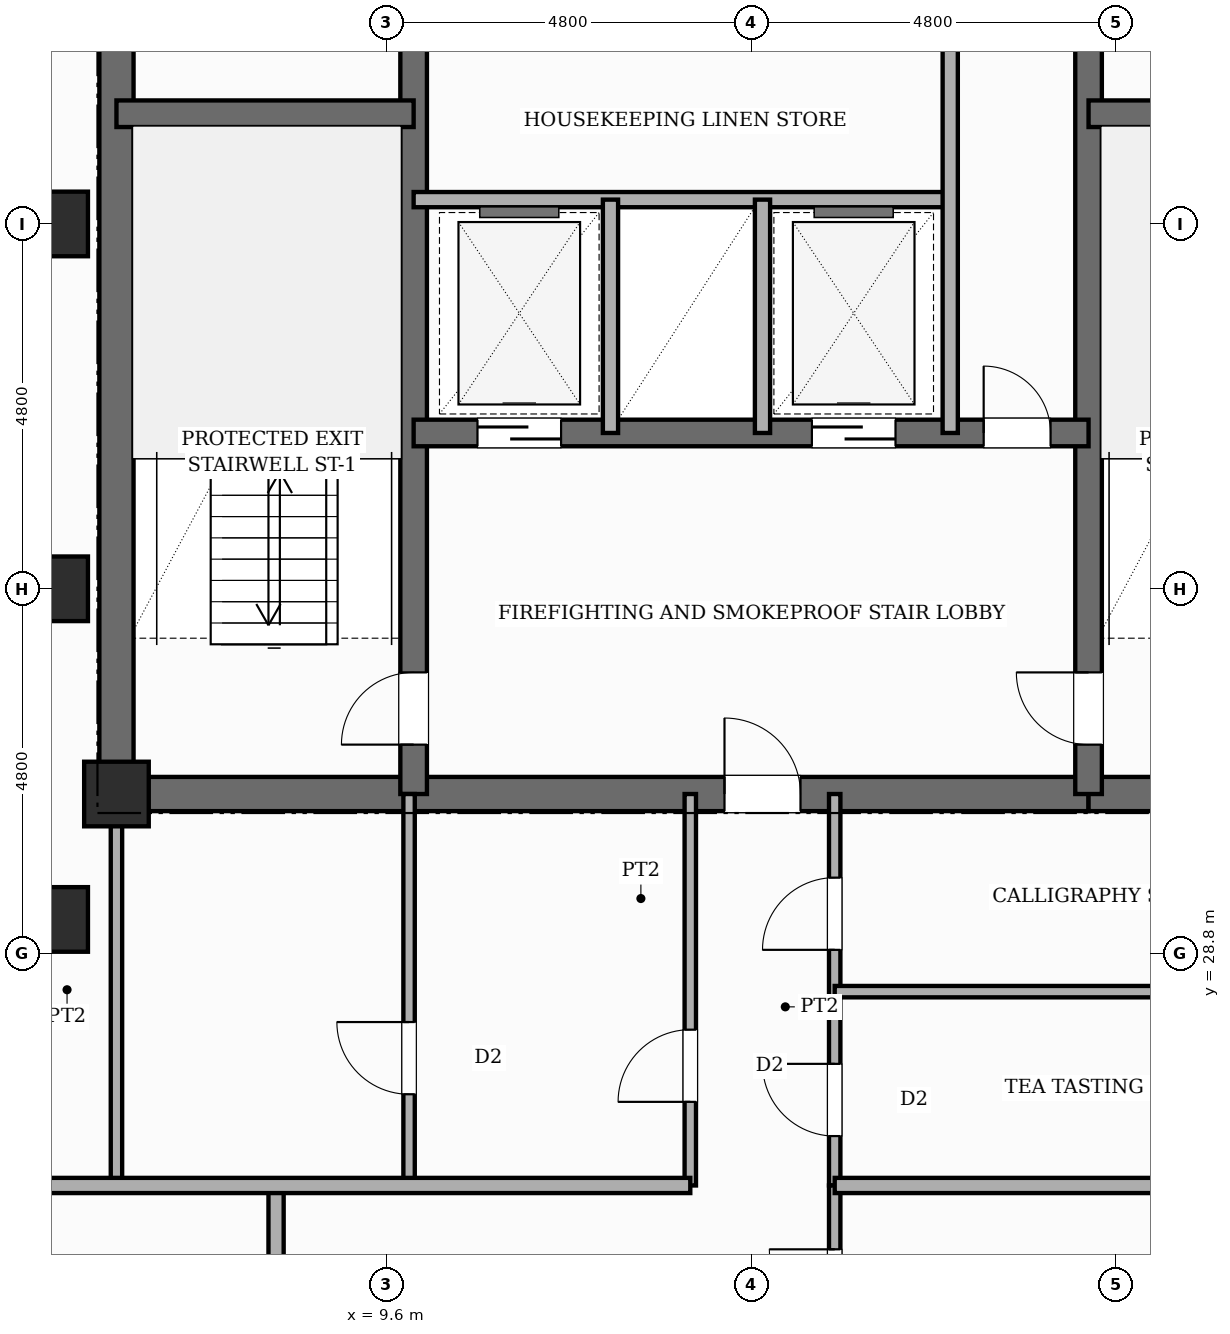
"""IFC4 building model, lengths in metres.
Left out: names, types, materials, properties, quantities, classifications, styles, units other than length and angle.
Written with IfcOpenShell. Run it as: python <this file> out.ifc"""

import sys

from ifc_helpers import new_model, si_unit, direction, frame, frame_2d, origin, origin_2d, place, context, subcontext, project, spatial, rectangle, extrude, element, fill, save


model = new_model("IFC4")
c1 = context("Model", 3, precision=1e-05, world=origin(), true_north=direction((0.0, 1.0)))
c2 = subcontext(c1, "Body", "Model", "MODEL_VIEW")
j1 = project(units=[si_unit("LENGTHUNIT", "METRE"), si_unit("PLANEANGLEUNIT", "RADIAN")], contexts=[c1])
p1 = place(None, origin())
s1 = spatial("IfcSite", under=j1, at=p1, CompositionType="ELEMENT")
p2 = place(p1, origin())
s2 = spatial("IfcBuilding", under=s1, at=p2, CompositionType="ELEMENT")
p3 = place(p2, frame((0.0, 0.0, 203.8)))
s3 = spatial("IfcBuildingStorey", under=s2, at=p3, CompositionType="ELEMENT", Elevation=203.8)
p4 = place(p3, frame((6.05, 30.675, 0.0), z_axis=(0.0, 0.0, 1.0), x_axis=(0.0, 1.0, 0.0)))
e1 = element("IfcWall", 1, at=p4, inside=s3, PredefinedType="SHEAR", context=c2, shape_type="SweptSolid", body=[
    extrude(rectangle(XDim=15.35, YDim=0.45, at=frame_2d((7.675, 0.0))), origin(), (0.0, 0.0, 1.0), 3.6),
])
p5 = place(p4, frame((10.675, 0.0, 0.0)))
e2 = element("IfcOpeningElement", 2, at=p5, cuts=e1, PredefinedType="OPENING", context=c2, shape_type="SweptSolid", body=[
    extrude(rectangle(XDim=0.95, YDim=2.15, at=frame_2d((0.475, 1.075))), frame((0.0, 0.235, 0.0), z_axis=(0.0, -1.0, 0.0), x_axis=(1.0, 0.0, 0.0)), (0.0, 0.0, 1.0), 0.47),
])
p6 = place(p3, frame((6.05, 30.9, 0.0), z_axis=(0.0, 0.0, 1.0), x_axis=(1.0, 0.0, 0.0)))
e3 = element("IfcWall", 3, at=p6, inside=s3, PredefinedType="SHEAR", context=c2, shape_type="SweptSolid", body=[
    extrude(rectangle(XDim=3.91, YDim=0.45, at=frame_2d((1.955, 0.0))), origin(), (0.0, 0.0, 1.0), 3.6),
])
p7 = place(p3, frame((9.96, 30.9, 0.0), z_axis=(0.0, 0.0, 1.0), x_axis=(1.0, 0.0, 0.0)))
e4 = element("IfcWall", 4, at=p7, inside=s3, PredefinedType="SHEAR", context=c2, shape_type="SweptSolid", body=[
    extrude(rectangle(XDim=8.88, YDim=0.45, at=frame_2d((4.44, 0.0))), origin(), (0.0, 0.0, 1.0), 3.6),
])
p8 = place(p7, frame((4.09, 0.0, 0.0)))
e5 = element("IfcOpeningElement", 5, at=p8, cuts=e4, PredefinedType="OPENING", context=c2, shape_type="SweptSolid", body=[
    extrude(rectangle(XDim=1.0, YDim=2.15, at=frame_2d((0.5, 1.075))), frame((0.0, 0.235, 0.0), z_axis=(0.0, -1.0, 0.0), x_axis=(1.0, 0.0, 0.0)), (0.0, 0.0, 1.0), 0.47),
])
p9 = place(p3, frame((18.84, 30.9, 0.0), z_axis=(0.0, 0.0, 1.0), x_axis=(1.0, 0.0, 0.0)))
e6 = element("IfcWall", 6, at=p9, inside=s3, PredefinedType="SHEAR", context=c2, shape_type="SweptSolid", body=[
    extrude(rectangle(XDim=3.91, YDim=0.45, at=frame_2d((1.955, 0.0))), origin(), (0.0, 0.0, 1.0), 3.6),
])
p10 = place(p3, frame((9.96, 30.9, 0.0), z_axis=(0.0, 0.0, 1.0), x_axis=(0.0, 1.0, 0.0)))
e7 = element("IfcWall", 7, at=p10, inside=s3, PredefinedType="SHEAR", context=c2, shape_type="SweptSolid", body=[
    extrude(rectangle(XDim=14.9, YDim=0.35, at=frame_2d((7.45, 0.0))), origin(), (0.0, 0.0, 1.0), 3.6),
])
p11 = place(p10, frame((0.65, 0.0, 0.0)))
e8 = element("IfcOpeningElement", 8, at=p11, cuts=e7, PredefinedType="OPENING", context=c2, shape_type="SweptSolid", body=[
    extrude(rectangle(XDim=0.95, YDim=2.1, at=frame_2d((0.475, 1.05))), frame((0.0, 0.185, 0.0), z_axis=(0.0, -1.0, 0.0), x_axis=(1.0, 0.0, 0.0)), (0.0, 0.0, 1.0), 0.37),
])
p12 = place(p10, frame((10.45, 0.0, 0.0)))
e9 = element("IfcOpeningElement", 9, at=p12, cuts=e7, PredefinedType="OPENING", context=c2, shape_type="SweptSolid", body=[
    extrude(rectangle(XDim=1.0, YDim=2.15, at=frame_2d((0.5, 1.075))), frame((0.0, 0.185, 0.0), z_axis=(0.0, -1.0, 0.0), x_axis=(1.0, 0.0, 0.0)), (0.0, 0.0, 1.0), 0.37),
])
p13 = place(p3, frame((18.84, 30.9, 0.0), z_axis=(0.0, 0.0, 1.0), x_axis=(0.0, 1.0, 0.0)))
e10 = element("IfcWall", 10, at=p13, inside=s3, PredefinedType="SHEAR", context=c2, shape_type="SweptSolid", body=[
    extrude(rectangle(XDim=14.9, YDim=0.35, at=frame_2d((7.45, 0.0))), origin(), (0.0, 0.0, 1.0), 3.6),
])
p14 = place(p13, frame((0.65, 0.0, 0.0)))
e11 = element("IfcOpeningElement", 11, at=p14, cuts=e10, PredefinedType="OPENING", context=c2, shape_type="SweptSolid", body=[
    extrude(rectangle(XDim=0.95, YDim=2.1, at=frame_2d((0.475, 1.05))), frame((0.0, 0.185, 0.0), z_axis=(0.0, -1.0, 0.0), x_axis=(1.0, 0.0, 0.0)), (0.0, 0.0, 1.0), 0.37),
])
p15 = place(p13, frame((10.45, 0.0, 0.0)))
e12 = element("IfcOpeningElement", 12, at=p15, cuts=e10, PredefinedType="OPENING", context=c2, shape_type="SweptSolid", body=[
    extrude(rectangle(XDim=1.0, YDim=2.15, at=frame_2d((0.5, 1.075))), frame((0.0, 0.185, 0.0), z_axis=(0.0, -1.0, 0.0), x_axis=(1.0, 0.0, 0.0)), (0.0, 0.0, 1.0), 0.37),
])
for number, where, z_axis, x_axis in (
    (13, (6.05, 39.85, 0.0), (0.0, 0.0, 1.0), (1.0, 0.0, 0.0)),
    (14, (18.84, 39.85, 0.0), (0.0, 0.0, 1.0), (1.0, 0.0, 0.0)),
):
    element("IfcWall", number, at=place(p3, frame(where, z_axis=z_axis, x_axis=x_axis)), inside=s3, PredefinedType="SHEAR", context=c2, shape_type="SweptSolid", body=[
        extrude(rectangle(XDim=3.91, YDim=0.35, at=frame_2d((1.955, 0.0))), origin(), (0.0, 0.0, 1.0), 3.6),
    ])
p16 = place(p3, frame((9.96, 35.65, 0.0), z_axis=(0.0, 0.0, 1.0), x_axis=(1.0, 0.0, 0.0)))
e15 = element("IfcWall", 15, at=p16, inside=s3, PredefinedType="SHEAR", context=c2, shape_type="SweptSolid", body=[
    extrude(rectangle(XDim=8.88, YDim=0.35, at=frame_2d((4.44, 0.0))), origin(), (0.0, 0.0, 1.0), 3.6),
])
p17 = place(p16, frame((0.84, 0.0, 0.0)))
e16 = element("IfcOpeningElement", 16, at=p17, cuts=e15, PredefinedType="OPENING", context=c2, shape_type="SweptSolid", body=[
    extrude(rectangle(XDim=1.1, YDim=2.15, at=frame_2d((0.55, 1.075))), frame((0.0, 0.185, 0.0), z_axis=(0.0, -1.0, 0.0), x_axis=(1.0, 0.0, 0.0)), (0.0, 0.0, 1.0), 0.37),
])
p18 = place(p16, frame((5.24, 0.0, 0.0)))
e17 = element("IfcOpeningElement", 17, at=p18, cuts=e15, PredefinedType="OPENING", context=c2, shape_type="SweptSolid", body=[
    extrude(rectangle(XDim=1.1, YDim=2.15, at=frame_2d((0.55, 1.075))), frame((0.0, 0.185, 0.0), z_axis=(0.0, -1.0, 0.0), x_axis=(1.0, 0.0, 0.0)), (0.0, 0.0, 1.0), 0.37),
])
p19 = place(p16, frame((7.5, 0.0, 0.0)))
e18 = element("IfcOpeningElement", 18, at=p19, cuts=e15, PredefinedType="OPENING", context=c2, shape_type="SweptSolid", body=[
    extrude(rectangle(XDim=0.88, YDim=2.1, at=frame_2d((0.44, 1.05))), frame((0.0, 0.185, 0.0), z_axis=(0.0, -1.0, 0.0), x_axis=(1.0, 0.0, 0.0)), (0.0, 0.0, 1.0), 0.37),
])
for number, where, z_axis, x_axis in (
    (19, (5.25, 29.25, 0.0), (0.0, 0.0, 1.0), (1.0, 0.0, 0.0)),
    (20, (5.25, 33.6, 0.0), (0.0, 0.0, 1.0), (1.0, 0.0, 0.0)),
    (21, (5.25, 38.4, 0.0), (0.0, 0.0, 1.0), (1.0, 0.0, 0.0)),
    (22, (6.05, 30.9, 0.0), (0.0, 0.0, 1.0), (1.0, 0.0, 0.0)),
):
    element("IfcColumn", number, at=place(p3, frame(where, z_axis=z_axis, x_axis=x_axis)), inside=s3, PredefinedType="COLUMN", context=c2, shape_type="SweptSolid", body=[
        extrude(rectangle(XDim=0.85, YDim=0.85, at=origin_2d()), origin(), (0.0, 0.0, 1.0), 3.6),
    ])
p20 = place(p3, frame((9.96, 38.72, 0.0), z_axis=(0.0, 0.0, 1.0), x_axis=(1.0, 0.0, 0.0)))
e23 = element("IfcWall", 23, at=p20, inside=s3, PredefinedType="POLYGONAL", context=c2, shape_type="SweptSolid", body=[
    extrude(rectangle(XDim=7.06, YDim=0.2, at=frame_2d((3.53, 0.0))), origin(), (0.0, 0.0, 1.0), 3.38),
])
for number, where, z_axis, x_axis in (
    (24, (12.55, 35.65, 0.0), (0.0, 0.0, 1.0), (0.0, 1.0, 0.0)),
    (25, (14.55, 35.65, 0.0), (0.0, 0.0, 1.0), (0.0, 1.0, 0.0)),
):
    element("IfcWall", number, at=place(p3, frame(where, z_axis=z_axis, x_axis=x_axis)), inside=s3, PredefinedType="POLYGONAL", context=c2, shape_type="SweptSolid", body=[
        extrude(rectangle(XDim=3.07, YDim=0.2, at=frame_2d((1.535, 0.0))), origin(), (0.0, 0.0, 1.0), 3.38),
    ])
p21 = place(p3, frame((17.02, 35.65, 0.0), z_axis=(0.0, 0.0, 1.0), x_axis=(0.0, 1.0, 0.0)))
e26 = element("IfcWall", 26, at=p21, inside=s3, PredefinedType="POLYGONAL", context=c2, shape_type="SweptSolid", body=[
    extrude(rectangle(XDim=5.15, YDim=0.2, at=frame_2d((2.575, 0.0))), origin(), (0.0, 0.0, 1.0), 3.38),
])
p22 = place(p3, frame((13.6, 25.75, 0.0), z_axis=(0.0, 0.0, 1.0), x_axis=(0.0, 1.0, 0.0)))
e27 = element("IfcWall", 27, at=p22, inside=s3, PredefinedType="PARTITIONING", context=c2, shape_type="SweptSolid", body=[
    extrude(rectangle(XDim=5.15, YDim=0.15, at=frame_2d((2.575, 0.0))), origin(), (0.0, 0.0, 1.0), 3.38),
])
p23 = place(p22, frame((1.1, 0.0, 0.0)))
e28 = element("IfcOpeningElement", 28, at=p23, cuts=e27, PredefinedType="OPENING", context=c2, shape_type="SweptSolid", body=[
    extrude(rectangle(XDim=0.95, YDim=2.15, at=frame_2d((0.475, 1.075))), frame((0.0, 0.085, 0.0), z_axis=(0.0, -1.0, 0.0), x_axis=(1.0, 0.0, 0.0)), (0.0, 0.0, 1.0), 0.17),
])
p24 = place(p3, frame((15.5, 25.75, 0.0), z_axis=(0.0, 0.0, 1.0), x_axis=(0.0, 1.0, 0.0)))
e29 = element("IfcWall", 29, at=p24, inside=s3, PredefinedType="PARTITIONING", context=c2, shape_type="SweptSolid", body=[
    extrude(rectangle(XDim=5.15, YDim=0.15, at=frame_2d((2.575, 0.0))), origin(), (0.0, 0.0, 1.0), 3.38),
])
p25 = place(p24, frame((0.65, 0.0, 0.0)))
e30 = element("IfcOpeningElement", 30, at=p25, cuts=e29, PredefinedType="OPENING", context=c2, shape_type="SweptSolid", body=[
    extrude(rectangle(XDim=0.95, YDim=2.15, at=frame_2d((0.475, 1.075))), frame((0.0, 0.085, 0.0), z_axis=(0.0, -1.0, 0.0), x_axis=(1.0, 0.0, 0.0)), (0.0, 0.0, 1.0), 0.17),
])
p26 = place(p24, frame((3.1, 0.0, 0.0)))
e31 = element("IfcOpeningElement", 31, at=p26, cuts=e29, PredefinedType="OPENING", context=c2, shape_type="SweptSolid", body=[
    extrude(rectangle(XDim=0.95, YDim=2.15, at=frame_2d((0.475, 1.075))), frame((0.0, 0.085, 0.0), z_axis=(0.0, -1.0, 0.0), x_axis=(1.0, 0.0, 0.0)), (0.0, 0.0, 1.0), 0.17),
])
p27 = place(p3, frame((6.05, 25.75, 0.0), z_axis=(0.0, 0.0, 1.0), x_axis=(0.0, 1.0, 0.0)))
e32 = element("IfcWall", 32, at=p27, inside=s3, PredefinedType="PARTITIONING", context=c2, shape_type="SweptSolid", body=[
    extrude(rectangle(XDim=5.15, YDim=0.15, at=frame_2d((2.575, 0.0))), origin(), (0.0, 0.0, 1.0), 3.38),
])
p28 = place(p3, frame((9.9, 25.75, 0.0), z_axis=(0.0, 0.0, 1.0), x_axis=(0.0, 1.0, 0.0)))
e33 = element("IfcWall", 33, at=p28, inside=s3, PredefinedType="PARTITIONING", context=c2, shape_type="SweptSolid", body=[
    extrude(rectangle(XDim=5.15, YDim=0.15, at=frame_2d((2.575, 0.0))), origin(), (0.0, 0.0, 1.0), 3.38),
])
p29 = place(p28, frame((1.2, 0.0, 0.0)))
e34 = element("IfcOpeningElement", 34, at=p29, cuts=e33, PredefinedType="OPENING", context=c2, shape_type="SweptSolid", body=[
    extrude(rectangle(XDim=0.95, YDim=2.15, at=frame_2d((0.475, 1.075))), frame((0.0, 0.085, 0.0), z_axis=(0.0, -1.0, 0.0), x_axis=(1.0, 0.0, 0.0)), (0.0, 0.0, 1.0), 0.17),
])
p30 = place(p3, frame((15.5, 28.3, 0.0), z_axis=(0.0, 0.0, 1.0), x_axis=(1.0, 0.0, 0.0)))
e35 = element("IfcWall", 35, at=p30, inside=s3, PredefinedType="PARTITIONING", context=c2, shape_type="SweptSolid", body=[
    extrude(rectangle(XDim=7.25, YDim=0.15, at=frame_2d((3.625, 0.0))), origin(), (0.0, 0.0, 1.0), 3.38),
])
p31 = place(p3, frame((8.15, 9.88, 0.0), z_axis=(0.0, 0.0, 1.0), x_axis=(0.0, 1.0, 0.0)))
e36 = element("IfcWall", 36, at=p31, inside=s3, PredefinedType="PARTITIONING", context=c2, shape_type="SweptSolid", body=[
    extrude(rectangle(XDim=15.87, YDim=0.2, at=frame_2d((7.935, 0.0))), origin(), (0.0, 0.0, 1.0), 3.38),
])
p32 = place(p31, frame((3.49, 0.0, 0.0)))
e37 = element("IfcOpeningElement", 37, at=p32, cuts=e36, PredefinedType="OPENING", context=c2, shape_type="SweptSolid", body=[
    extrude(rectangle(XDim=0.95, YDim=2.15, at=frame_2d((0.475, 1.075))), frame((0.0, 0.11, 0.0), z_axis=(0.0, -1.0, 0.0), x_axis=(1.0, 0.0, 0.0)), (0.0, 0.0, 1.0), 0.22),
])
p33 = place(p31, frame((11.41, 0.0, 0.0)))
e38 = element("IfcOpeningElement", 38, at=p33, cuts=e36, PredefinedType="OPENING", context=c2, shape_type="SweptSolid", body=[
    extrude(rectangle(XDim=0.95, YDim=2.15, at=frame_2d((0.475, 1.075))), frame((0.0, 0.11, 0.0), z_axis=(0.0, -1.0, 0.0), x_axis=(1.0, 0.0, 0.0)), (0.0, 0.0, 1.0), 0.22),
])
p34 = place(p3, frame((5.08, 25.75, 0.0), z_axis=(0.0, 0.0, 1.0), x_axis=(1.0, 0.0, 0.0)))
e39 = element("IfcWall", 39, at=p34, inside=s3, PredefinedType="PARTITIONING", context=c2, shape_type="SweptSolid", body=[
    extrude(rectangle(XDim=8.52, YDim=0.2, at=frame_2d((4.26, 0.0))), origin(), (0.0, 0.0, 1.0), 3.38),
])
p35 = place(p3, frame((15.5, 23.4, 0.0), z_axis=(0.0, 0.0, 1.0), x_axis=(0.0, 1.0, 0.0)))
e40 = element("IfcWall", 40, at=p35, inside=s3, PredefinedType="PARTITIONING", context=c2, shape_type="SweptSolid", body=[
    extrude(rectangle(XDim=2.35, YDim=0.15, at=frame_2d((1.175, 0.0))), origin(), (0.0, 0.0, 1.0), 3.38),
])
p36 = place(p35, frame((0.65, 0.0, 0.0)))
e41 = element("IfcOpeningElement", 41, at=p36, cuts=e40, PredefinedType="OPENING", context=c2, shape_type="SweptSolid", body=[
    extrude(rectangle(XDim=0.86, YDim=2.1, at=frame_2d((0.43, 1.05))), frame((0.0, 0.085, 0.0), z_axis=(0.0, -1.0, 0.0), x_axis=(1.0, 0.0, 0.0)), (0.0, 0.0, 1.0), 0.17),
])
p37 = place(p3, frame((15.5, 25.75, 0.0), z_axis=(0.0, 0.0, 1.0), x_axis=(1.0, 0.0, 0.0)))
e42 = element("IfcWall", 42, at=p37, inside=s3, PredefinedType="PARTITIONING", context=c2, shape_type="SweptSolid", body=[
    extrude(rectangle(XDim=8.22, YDim=0.2, at=frame_2d((4.11, 0.0))), origin(), (0.0, 0.0, 1.0), 3.38),
])
p38 = place(p11, origin())
e43 = element("IfcDoor", 43, at=p38, inside=s3, OperationType="SINGLE_SWING_LEFT", PredefinedType="DOOR", context=c2, shape_type="SweptSolid", body=[
    extrude(rectangle(XDim=0.95, YDim=2.1, at=frame_2d((0.475, 1.05))), frame((0.0, 0.025, 0.0), z_axis=(0.0, -1.0, 0.0), x_axis=(1.0, 0.0, 0.0)), (0.0, 0.0, 1.0), 0.05),
])
fill(e8, e43)
p39 = place(p14, origin())
e44 = element("IfcDoor", 44, at=p39, inside=s3, OperationType="SINGLE_SWING_RIGHT", PredefinedType="DOOR", context=c2, shape_type="SweptSolid", body=[
    extrude(rectangle(XDim=0.95, YDim=2.1, at=frame_2d((0.475, 1.05))), frame((0.0, 0.025, 0.0), z_axis=(0.0, -1.0, 0.0), x_axis=(1.0, 0.0, 0.0)), (0.0, 0.0, 1.0), 0.05),
])
fill(e11, e44)
p40 = place(p8, origin())
e45 = element("IfcDoor", 45, at=p40, inside=s3, OperationType="SINGLE_SWING_LEFT", PredefinedType="DOOR", context=c2, shape_type="SweptSolid", body=[
    extrude(rectangle(XDim=1.0, YDim=2.15, at=frame_2d((0.5, 1.075))), frame((0.0, 0.025, 0.0), z_axis=(0.0, -1.0, 0.0), x_axis=(1.0, 0.0, 0.0)), (0.0, 0.0, 1.0), 0.05),
])
fill(e5, e45)
p41 = place(p17, origin())
e46 = element("IfcDoor", 46, at=p41, inside=s3, OperationType="SLIDING_TO_LEFT", PredefinedType="DOOR", context=c2, shape_type="SweptSolid", body=[
    extrude(rectangle(XDim=1.1, YDim=2.15, at=frame_2d((0.55, 1.075))), frame((0.0, 0.025, 0.0), z_axis=(0.0, -1.0, 0.0), x_axis=(1.0, 0.0, 0.0)), (0.0, 0.0, 1.0), 0.05),
])
fill(e16, e46)
p42 = place(p18, origin())
e47 = element("IfcDoor", 47, at=p42, inside=s3, OperationType="SLIDING_TO_RIGHT", PredefinedType="DOOR", context=c2, shape_type="SweptSolid", body=[
    extrude(rectangle(XDim=1.1, YDim=2.15, at=frame_2d((0.55, 1.075))), frame((0.0, 0.025, 0.0), z_axis=(0.0, -1.0, 0.0), x_axis=(1.0, 0.0, 0.0)), (0.0, 0.0, 1.0), 0.05),
])
fill(e17, e47)
p43 = place(p19, origin())
e48 = element("IfcDoor", 48, at=p43, inside=s3, OperationType="SINGLE_SWING_LEFT", PredefinedType="DOOR", context=c2, shape_type="SweptSolid", body=[
    extrude(rectangle(XDim=0.88, YDim=2.1, at=frame_2d((0.44, 1.05))), frame((0.0, 0.025, 0.0), z_axis=(0.0, -1.0, 0.0), x_axis=(1.0, 0.0, 0.0)), (0.0, 0.0, 1.0), 0.05),
])
fill(e18, e48)
p44 = place(p23, origin())
e49 = element("IfcDoor", 49, at=p44, inside=s3, OperationType="SINGLE_SWING_LEFT", PredefinedType="DOOR", context=c2, shape_type="SweptSolid", body=[
    extrude(rectangle(XDim=0.95, YDim=2.15, at=frame_2d((0.475, 1.075))), frame((0.0, 0.025, 0.0), z_axis=(0.0, -1.0, 0.0), x_axis=(1.0, 0.0, 0.0)), (0.0, 0.0, 1.0), 0.05),
])
fill(e28, e49)
p45 = place(p29, origin())
e50 = element("IfcDoor", 50, at=p45, inside=s3, OperationType="SINGLE_SWING_RIGHT", PredefinedType="DOOR", context=c2, shape_type="SweptSolid", body=[
    extrude(rectangle(XDim=0.95, YDim=2.15, at=frame_2d((0.475, 1.075))), frame((0.0, 0.025, 0.0), z_axis=(0.0, -1.0, 0.0), x_axis=(1.0, 0.0, 0.0)), (0.0, 0.0, 1.0), 0.05),
])
fill(e34, e50)
p46 = place(p25, origin())
e51 = element("IfcDoor", 51, at=p46, inside=s3, OperationType="SINGLE_SWING_RIGHT", PredefinedType="DOOR", context=c2, shape_type="SweptSolid", body=[
    extrude(rectangle(XDim=0.95, YDim=2.15, at=frame_2d((0.475, 1.075))), frame((0.0, 0.025, 0.0), z_axis=(0.0, -1.0, 0.0), x_axis=(1.0, 0.0, 0.0)), (0.0, 0.0, 1.0), 0.05),
])
fill(e30, e51)
p47 = place(p26, origin())
e52 = element("IfcDoor", 52, at=p47, inside=s3, OperationType="SINGLE_SWING_LEFT", PredefinedType="DOOR", context=c2, shape_type="SweptSolid", body=[
    extrude(rectangle(XDim=0.95, YDim=2.15, at=frame_2d((0.475, 1.075))), frame((0.0, 0.025, 0.0), z_axis=(0.0, -1.0, 0.0), x_axis=(1.0, 0.0, 0.0)), (0.0, 0.0, 1.0), 0.05),
])
fill(e31, e52)
p48 = place(p36, origin())
e53 = element("IfcDoor", 53, at=p48, inside=s3, OperationType="SINGLE_SWING_RIGHT", PredefinedType="DOOR", context=c2, shape_type="SweptSolid", body=[
    extrude(rectangle(XDim=0.86, YDim=2.1, at=frame_2d((0.43, 1.05))), frame((0.0, 0.025, 0.0), z_axis=(0.0, -1.0, 0.0), x_axis=(1.0, 0.0, 0.0)), (0.0, 0.0, 1.0), 0.05),
])
fill(e41, e53)
save(model, sys.argv[1])
